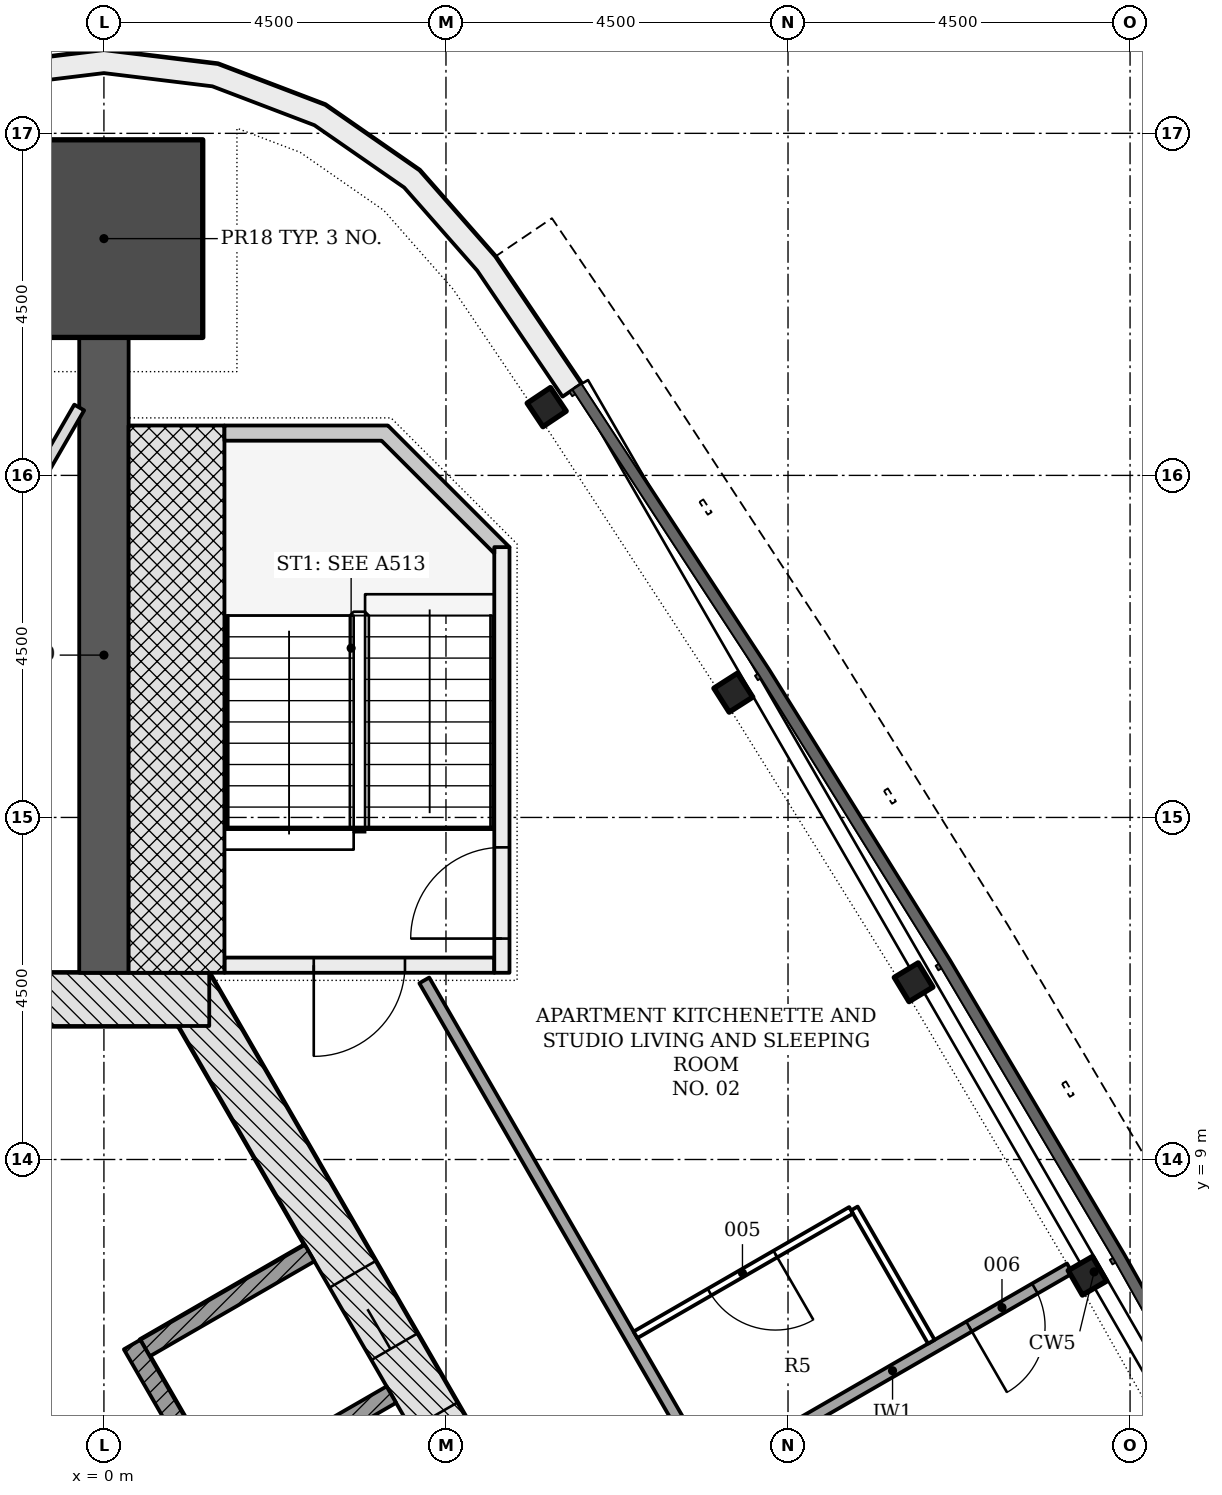
"""IFC4 building model, lengths in metres.
Left out: names, types, materials, properties, quantities, classifications, styles, units other than length and angle.
Written with IfcOpenShell. Run it as: python <this file> out.ifc"""

import sys

from ifc_helpers import new_model, si_unit, direction, frame, frame_2d, origin, origin_2d, place, context, subcontext, project, spatial, polyline, rectangle, i_section, outline, extrude, element, fill, save


model = new_model("IFC4")
c1 = context("Model", 3, precision=1e-05, world=origin(), true_north=direction((0.0, 1.0)))
c2 = subcontext(c1, "Body", "Model", "MODEL_VIEW")
j1 = project(units=[si_unit("LENGTHUNIT", "METRE"), si_unit("PLANEANGLEUNIT", "RADIAN")], contexts=[c1])
p1 = place(None, origin())
s1 = spatial("IfcSite", under=j1, at=p1, CompositionType="ELEMENT")
p2 = place(p1, origin())
s2 = spatial("IfcBuilding", under=s1, at=p2, CompositionType="ELEMENT")
p3 = place(p2, frame((0.0, 0.0, 214.8)))
s3 = spatial("IfcBuildingStorey", under=s2, at=p3, CompositionType="ELEMENT", Elevation=214.8)
p4 = place(p3, frame((10.311, -4.703, -0.2), z_axis=(0.0, 0.0, 1.0), x_axis=(-0.500001446645, 0.866024568562, 0.0)))
e1 = element("IfcWall", 1, at=p4, inside=s3, PredefinedType="SHEAR", context=c2, shape_type="SweptSolid", body=[
    extrude(rectangle(XDim=18.458, YDim=0.7, at=frame_2d((9.229, 0.0))), origin(), (0.0, 0.0, 1.0), 3.6),
])
p5 = place(p4, frame((4.379, 0.0, 0.2)))
e2 = element("IfcOpeningElement", 2, at=p5, cuts=e1, PredefinedType="OPENING", context=c2, shape_type="SweptSolid", body=[
    extrude(rectangle(XDim=1.1, YDim=2.1, at=frame_2d((0.55, 1.05))), frame((0.0, 0.36, 0.0), z_axis=(0.0, -1.0, 0.0), x_axis=(1.0, 0.0, 0.0)), (0.0, 0.0, 1.0), 0.72),
])
p6 = place(p4, frame((6.529, 0.0, 0.2)))
e3 = element("IfcOpeningElement", 3, at=p6, cuts=e1, PredefinedType="OPENING", context=c2, shape_type="SweptSolid", body=[
    extrude(rectangle(XDim=1.1, YDim=2.1, at=frame_2d((0.55, 1.05))), frame((0.0, 0.36, 0.0), z_axis=(0.0, -1.0, 0.0), x_axis=(1.0, 0.0, 0.0)), (0.0, 0.0, 1.0), 0.72),
])
p7 = place(p4, frame((8.679, 0.0, 0.2)))
e4 = element("IfcOpeningElement", 4, at=p7, cuts=e1, PredefinedType="OPENING", context=c2, shape_type="SweptSolid", body=[
    extrude(rectangle(XDim=1.1, YDim=2.1, at=frame_2d((0.55, 1.05))), frame((0.0, 0.36, 0.0), z_axis=(0.0, -1.0, 0.0), x_axis=(1.0, 0.0, 0.0)), (0.0, 0.0, 1.0), 0.72),
])
p8 = place(p4, frame((10.829, 0.0, 0.2)))
e5 = element("IfcOpeningElement", 5, at=p8, cuts=e1, PredefinedType="OPENING", context=c2, shape_type="SweptSolid", body=[
    extrude(rectangle(XDim=1.1, YDim=2.1, at=frame_2d((0.55, 1.05))), frame((0.0, 0.36, 0.0), z_axis=(0.0, -1.0, 0.0), x_axis=(1.0, 0.0, 0.0)), (0.0, 0.0, 1.0), 0.72),
])
p9 = place(p4, frame((12.979, 0.0, 0.2)))
e6 = element("IfcOpeningElement", 6, at=p9, cuts=e1, PredefinedType="OPENING", context=c2, shape_type="SweptSolid", body=[
    extrude(rectangle(XDim=1.1, YDim=2.1, at=frame_2d((0.55, 1.05))), frame((0.0, 0.36, 0.0), z_axis=(0.0, -1.0, 0.0), x_axis=(1.0, 0.0, 0.0)), (0.0, 0.0, 1.0), 0.72),
])
p10 = place(p3, frame((1.386, 11.106, -0.2), z_axis=(0.0, 0.0, 1.0), x_axis=(-1.0, 0.0, 0.0)))
e7 = element("IfcWall", 7, at=p10, inside=s3, PredefinedType="SHEAR", context=c2, shape_type="SweptSolid", body=[
    extrude(rectangle(XDim=2.771, YDim=0.7, at=frame_2d((1.386, 0.0))), origin(), (0.0, 0.0, 1.0), 3.6),
])
p11 = place(p3, frame((0.0, 11.456, -0.2), z_axis=(0.0, 0.0, 1.0), x_axis=(0.0, 1.0, 0.0)))
e8 = element("IfcWall", 8, at=p11, inside=s3, PredefinedType="SHEAR", context=c2, shape_type="SweptSolid", body=[
    extrude(rectangle(XDim=8.359, YDim=0.65, at=frame_2d((4.179, 0.0))), origin(), (0.0, 0.0, 1.0), 3.6),
])
p12 = place(p3, frame((0.0, 21.115, -0.2), z_axis=(0.0, 0.0, 1.0), x_axis=(0.0, 1.0, 0.0)))
e9 = element("IfcColumn", 9, at=p12, inside=s3, PredefinedType="COLUMN", context=c2, shape_type="SweptSolid", body=[
    extrude(rectangle(XDim=2.6, YDim=2.6, at=origin_2d()), origin(), (0.0, 0.0, 1.0), 3.6),
])
for number, where, z_axis, x_axis in (
    (10, (12.939, 7.47, -0.2), (0.0, 0.0, 1.0), (-0.5, 0.866, 0.0)),
    (11, (10.652, 11.332, -0.2), (0.0, 0.0, 1.0), (-0.519, 0.855, 0.0)),
    (12, (8.281, 15.142, -0.2), (0.0, 0.0, 1.0), (-0.538, 0.843, 0.0)),
    (13, (5.825, 18.898, -0.2), (0.0, 0.0, 1.0), (-0.556, 0.831, 0.0)),
):
    element("IfcColumn", number, at=place(p3, frame(where, z_axis=z_axis, x_axis=x_axis)), inside=s3, PredefinedType="COLUMN", context=c2, shape_type="SweptSolid", body=[
        extrude(i_section(OverallWidth=0.373, OverallDepth=0.368, WebThickness=0.015, FlangeThickness=0.024, FilletRadius=0.015, at=origin_2d()), origin(), (0.0, 0.0, 1.0), 3.6),
    ])
p13 = place(p3, origin())
e14 = element("IfcWall", 14, at=p13, inside=s3, PredefinedType="NOTDEFINED", context=c2, shape_type="SweptSolid", body=[
    extrude(outline(polyline([(6.282, 19.204), (5.149, 20.879), (4.151, 22.013), (2.911, 22.874), (1.499, 23.412), (0.0, 23.595), (-1.499, 23.412), (-2.911, 22.874), (-4.151, 22.013), (-5.149, 20.879), (-6.282, 19.204), (-6.034, 19.036), (-4.911, 20.695), (-3.95, 21.787), (-2.77, 22.607), (-1.427, 23.119), (0.0, 23.293), (1.427, 23.119), (2.77, 22.607), (3.95, 21.787), (4.911, 20.695), (6.034, 19.036), (6.282, 19.204)])), origin(), (0.0, 0.0, 1.0), 3.3),
])
for number, where, z_axis, x_axis in (
    (15, (3.781, 5.907, -0.2), (0.0, 0.0, 1.0), (-0.866, -0.5, 0.0)),
    (16, (2.706, 7.769, -0.2), (0.0, 0.0, 1.0), (-0.866, -0.5, 0.0)),
):
    element("IfcWall", number, at=place(p3, frame(where, z_axis=z_axis, x_axis=x_axis)), inside=s3, PredefinedType="PARTITIONING", context=c2, shape_type="SweptSolid", body=[
        extrude(rectangle(XDim=2.5, YDim=0.25, at=frame_2d((1.25, 0.0))), origin(), (0.0, 0.0, 1.0), 3.6),
    ])
p14 = place(p3, frame((5.87, -2.961, 0.0), z_axis=(0.0, 0.0, 1.0), x_axis=(-0.50000615651, 0.866021849293, 0.0)))
e17 = element("IfcWall", 17, at=p14, inside=s3, PredefinedType="PARTITIONING", context=c2, shape_type="SweptSolid", body=[
    extrude(rectangle(XDim=11.0, YDim=0.25, at=frame_2d((5.5, 0.0))), origin(), (0.0, 0.0, 1.0), 3.4),
])
p15 = place(p3, frame((5.135, 11.556, -0.2), z_axis=(0.0, 0.0, 1.0), x_axis=(-1.0, 0.0, 0.0)))
e18 = element("IfcWall", 18, at=p15, inside=s3, PredefinedType="SHEAR", context=c2, shape_type="SweptSolid", body=[
    extrude(rectangle(XDim=3.55, YDim=0.2, at=frame_2d((1.775, 0.0))), origin(), (0.0, 0.0, 1.0), 3.6),
])
p16 = place(p15, frame((1.175, 0.0, 0.2)))
e19 = element("IfcOpeningElement", 19, at=p16, cuts=e18, PredefinedType="OPENING", context=c2, shape_type="SweptSolid", body=[
    extrude(rectangle(XDim=1.2, YDim=2.1, at=frame_2d((0.6, 1.05))), frame((0.0, 0.11, 0.0), z_axis=(0.0, -1.0, 0.0), x_axis=(1.0, 0.0, 0.0)), (0.0, 0.0, 1.0), 0.22),
])
p17 = place(p3, frame((5.236, 11.456, -0.2), z_axis=(0.0, 0.0, 1.0), x_axis=(0.0, 1.0, 0.0)))
e20 = element("IfcWall", 20, at=p17, inside=s3, PredefinedType="SHEAR", context=c2, shape_type="SweptSolid", body=[
    extrude(rectangle(XDim=5.6, YDim=0.2, at=frame_2d((2.8, 0.0))), origin(), (0.0, 0.0, 1.0), 3.6),
])
p18 = place(p17, frame((0.45, 0.0, 0.2)))
e21 = element("IfcOpeningElement", 21, at=p18, cuts=e20, PredefinedType="OPENING", context=c2, shape_type="SweptSolid", body=[
    extrude(rectangle(XDim=1.2, YDim=2.1, at=frame_2d((0.6, 1.05))), frame((0.0, 0.11, 0.0), z_axis=(0.0, -1.0, 0.0), x_axis=(1.0, 0.0, 0.0)), (0.0, 0.0, 1.0), 0.22),
])
p19 = place(p3, frame((0.955, 11.456, -0.2), z_axis=(0.0, 0.0, 1.0), x_axis=(0.0, 1.0, 0.0)))
e22 = element("IfcWall", 22, at=p19, inside=s3, PredefinedType="SHEAR", context=c2, shape_type="SweptSolid", body=[
    extrude(rectangle(XDim=7.2, YDim=1.261, at=frame_2d((3.6, 0.0))), origin(), (0.0, 0.0, 1.0), 3.6),
])
p20 = place(p3, frame((0.0, 0.0, -0.2)))
e23 = element("IfcWall", 23, at=p20, inside=s3, PredefinedType="SHEAR", context=c2, shape_type="SweptSolid", body=[
    extrude(outline(polyline([(5.336, 17.056), (3.736, 18.656), (1.586, 18.656), (1.586, 18.456), (3.653, 18.456), (5.135, 16.974), (5.135, 17.056), (5.135, 17.056), (5.135, 17.056), (5.135, 17.056), (5.135, 17.056), (5.135, 17.056), (5.135, 17.056), (5.135, 17.056), (5.135, 17.056), (5.135, 17.056), (5.135, 17.056), (5.135, 17.056), (5.135, 17.056), (5.135, 17.056), (5.135, 17.056), (5.135, 17.056), (5.135, 17.056), (5.336, 17.056)])), origin(), (0.0, 0.0, 1.0), 3.6),
])
p21 = place(p3, frame((7.979, 4.837, 0.0), z_axis=(0.0, 0.0, 1.0), x_axis=(-0.500014427086, 0.866017074142, 0.0)))
e24 = element("IfcWall", 24, at=p21, inside=s3, PredefinedType="PARTITIONING", context=c2, shape_type="SweptSolid", body=[
    extrude(rectangle(XDim=7.528, YDim=0.15, at=frame_2d((3.764, 0.0))), origin(), (0.0, 0.0, 1.0), 2.852),
])
p22 = place(p3, frame((12.707, 7.567, 0.0), z_axis=(0.0, 0.0, 1.0), x_axis=(-0.866016468327, -0.500015476347, 0.0)))
e25 = element("IfcWall", 25, at=p22, inside=s3, PredefinedType="PARTITIONING", context=c2, shape_type="SweptSolid", body=[
    extrude(rectangle(XDim=5.385, YDim=0.15, at=frame_2d((2.692, 0.0))), origin(), (0.0, 0.0, 1.0), 3.4),
])
p23 = place(p22, frame((0.53, 0.0, 0.0)))
e26 = element("IfcOpeningElement", 26, at=p23, cuts=e25, PredefinedType="OPENING", context=c2, shape_type="SweptSolid", body=[
    extrude(rectangle(XDim=1.0, YDim=2.1, at=frame_2d((0.5, 1.05))), frame((0.0, 0.085, 0.0), z_axis=(0.0, -1.0, 0.0), x_axis=(1.0, 0.0, 0.0)), (0.0, 0.0, 1.0), 0.17),
])
p24 = place(p3, frame((10.885, 6.602, 0.0), z_axis=(0.0, 0.0, 1.0), x_axis=(-0.499990325971, 0.866030989016, 0.0)))
e27 = element("IfcWall", 27, at=p24, inside=s3, PredefinedType="PARTITIONING", context=c2, shape_type="SweptSolid", body=[
    extrude(rectangle(XDim=2.025, YDim=0.1, at=frame_2d((1.012, 0.0))), origin(), (0.0, 0.0, 1.0), 3.4),
])
p25 = place(p3, frame((9.83, 8.331, 0.0), z_axis=(0.0, 0.0, 1.0), x_axis=(-0.865995643347, -0.500051543047, 0.0)))
e28 = element("IfcWall", 28, at=p25, inside=s3, PredefinedType="PARTITIONING", context=c2, shape_type="SweptSolid", body=[
    extrude(rectangle(XDim=3.275, YDim=0.1, at=frame_2d((1.638, 0.0))), origin(), (0.0, 0.0, 1.0), 3.4),
])
p26 = place(p25, frame((1.15, 0.0, 0.0)))
e29 = element("IfcOpeningElement", 29, at=p26, cuts=e28, PredefinedType="OPENING", context=c2, shape_type="SweptSolid", body=[
    extrude(rectangle(XDim=1.0, YDim=2.1, at=frame_2d((0.5, 1.05))), frame((0.0, 0.06, 0.0), z_axis=(0.0, -1.0, 0.0), x_axis=(1.0, 0.0, 0.0)), (0.0, 0.0, 1.0), 0.12),
])
p27 = place(p3, frame((-0.325, 18.894, 0.0), z_axis=(0.0, 0.0, 1.0), x_axis=(-0.50000126085, -0.866024675831, 0.0)))
e30 = element("IfcWall", 30, at=p27, inside=s3, PredefinedType="PARTITIONING", context=c2, shape_type="SweptSolid", body=[
    extrude(rectangle(XDim=12.027, YDim=0.15, at=frame_2d((6.013, 0.0))), origin(), (0.0, 0.0, 1.0), 2.852),
])
p28 = place(p8, origin())
e31 = element("IfcDoor", 31, at=p28, inside=s3, OperationType="DOUBLE_DOOR_SLIDING", PredefinedType="DOOR", context=c2, shape_type="SweptSolid", body=[
    extrude(rectangle(XDim=1.1, YDim=2.1, at=frame_2d((0.55, 1.05))), frame((0.0, 0.025, 0.0), z_axis=(0.0, -1.0, 0.0), x_axis=(1.0, 0.0, 0.0)), (0.0, 0.0, 1.0), 0.05),
])
fill(e5, e31)
p29 = place(p9, origin())
e32 = element("IfcDoor", 32, at=p29, inside=s3, OperationType="DOUBLE_DOOR_SLIDING", PredefinedType="DOOR", context=c2, shape_type="SweptSolid", body=[
    extrude(rectangle(XDim=1.1, YDim=2.1, at=frame_2d((0.55, 1.05))), frame((0.0, 0.025, 0.0), z_axis=(0.0, -1.0, 0.0), x_axis=(1.0, 0.0, 0.0)), (0.0, 0.0, 1.0), 0.05),
])
fill(e6, e32)
p30 = place(p16, origin())
e33 = element("IfcDoor", 33, at=p30, inside=s3, OperationType="SINGLE_SWING_RIGHT", PredefinedType="DOOR", context=c2, shape_type="SweptSolid", body=[
    extrude(rectangle(XDim=1.2, YDim=2.1, at=frame_2d((0.6, 1.05))), frame((0.0, 0.025, 0.0), z_axis=(0.0, -1.0, 0.0), x_axis=(1.0, 0.0, 0.0)), (0.0, 0.0, 1.0), 0.05),
])
fill(e19, e33)
p31 = place(p18, origin())
e34 = element("IfcDoor", 34, at=p31, inside=s3, OperationType="SINGLE_SWING_LEFT", PredefinedType="DOOR", context=c2, shape_type="SweptSolid", body=[
    extrude(rectangle(XDim=1.2, YDim=2.1, at=frame_2d((0.6, 1.05))), frame((0.0, 0.025, 0.0), z_axis=(0.0, -1.0, 0.0), x_axis=(1.0, 0.0, 0.0)), (0.0, 0.0, 1.0), 0.05),
])
fill(e21, e34)
p32 = place(p26, origin())
e35 = element("IfcDoor", 35, at=p32, inside=s3, OperationType="SINGLE_SWING_LEFT", PredefinedType="DOOR", context=c2, shape_type="SweptSolid", body=[
    extrude(rectangle(XDim=1.0, YDim=2.1, at=frame_2d((0.5, 1.05))), frame((0.0, 0.025, 0.0), z_axis=(0.0, -1.0, 0.0), x_axis=(1.0, 0.0, 0.0)), (0.0, 0.0, 1.0), 0.05),
])
fill(e29, e35)
p33 = place(p23, origin())
e36 = element("IfcDoor", 36, at=p33, inside=s3, OperationType="SINGLE_SWING_RIGHT", PredefinedType="DOOR", context=c2, shape_type="SweptSolid", body=[
    extrude(rectangle(XDim=1.0, YDim=2.1, at=frame_2d((0.5, 1.05))), frame((0.0, 0.025, 0.0), z_axis=(0.0, -1.0, 0.0), x_axis=(1.0, 0.0, 0.0)), (0.0, 0.0, 1.0), 0.05),
])
fill(e26, e36)
save(model, sys.argv[1])
